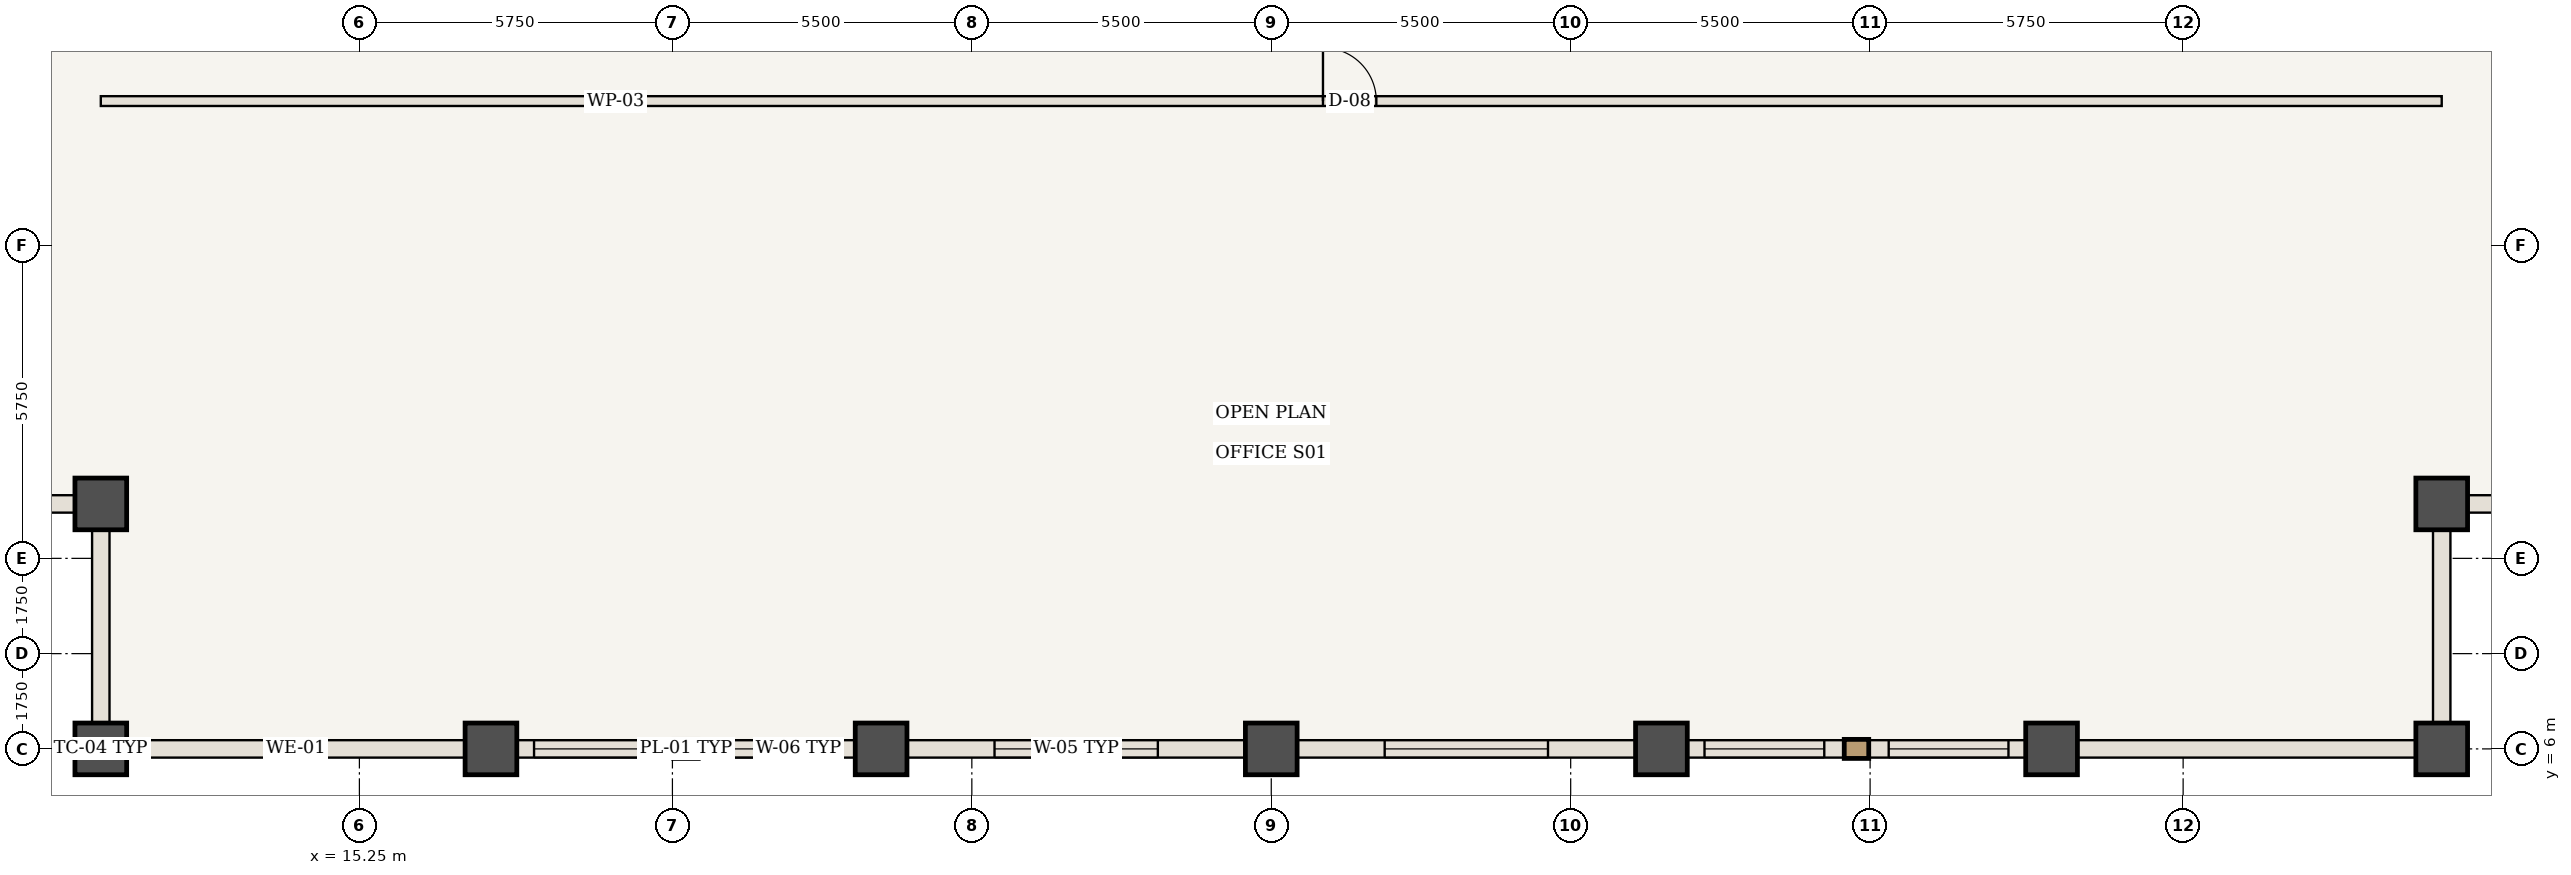
"""IFC4 building model, lengths in metres.
Left out: names, types, materials, properties, quantities, classifications, styles, units other than length and angle.
Written with IfcOpenShell. Run it as: python <this file> out.ifc"""

import sys

from ifc_helpers import new_model, si_unit, direction, frame, frame_2d, origin, origin_2d, place, context, subcontext, project, spatial, rectangle, extrude, element, fill, save


model = new_model("IFC4")
c1 = context("Model", 3, precision=1e-05, world=origin(), true_north=direction((0.0, 1.0)))
c2 = subcontext(c1, "Body", "Model", "MODEL_VIEW")
j1 = project(units=[si_unit("LENGTHUNIT", "METRE"), si_unit("PLANEANGLEUNIT", "RADIAN")], contexts=[c1])
p1 = place(None, origin())
s1 = spatial("IfcSite", under=j1, at=p1, CompositionType="ELEMENT")
p2 = place(p1, origin())
s2 = spatial("IfcBuilding", under=s1, at=p2, CompositionType="ELEMENT")
p3 = place(p2, frame((0.0, 0.0, 152.95)))
s3 = spatial("IfcBuildingStorey", under=s2, at=p3, CompositionType="ELEMENT", Elevation=152.95)
for number, where, z_axis, x_axis in (
    (1, (10.5, 6.0, 0.0), (0.0, 0.0, 1.0), (1.0, 0.0, 0.0)),
    (2, (10.5, 10.5, 0.0), (0.0, 0.0, 1.0), (1.0, 0.0, 0.0)),
    (3, (53.5, 6.0, 0.0), (0.0, 0.0, 1.0), (1.0, 0.0, 0.0)),
    (4, (53.5, 10.5, 0.0), (0.0, 0.0, 1.0), (1.0, 0.0, 0.0)),
    (5, (17.667, 6.0, 0.0), (0.0, 0.0, 1.0), (1.0, 0.0, 0.0)),
    (6, (24.833, 6.0, 0.0), (0.0, 0.0, 1.0), (1.0, 0.0, 0.0)),
    (7, (32.0, 6.0, 0.0), (0.0, 0.0, 1.0), (1.0, 0.0, 0.0)),
    (8, (39.167, 6.0, 0.0), (0.0, 0.0, 1.0), (1.0, 0.0, 0.0)),
    (9, (46.333, 6.0, 0.0), (0.0, 0.0, 1.0), (1.0, 0.0, 0.0)),
):
    element("IfcColumn", number, at=place(p3, frame(where, z_axis=z_axis, x_axis=x_axis)), inside=s3, PredefinedType="COLUMN", context=c2, shape_type="SweptSolid", body=[
        extrude(rectangle(XDim=0.95, YDim=0.95, at=origin_2d()), origin(), (0.0, 0.0, 1.0), 3.85),
    ])
p4 = place(p3, frame((10.5, 17.9, 0.0), z_axis=(0.0, 0.0, 1.0), x_axis=(1.0, 0.0, 0.0)))
e10 = element("IfcWall", 10, at=p4, inside=s3, PredefinedType="STANDARD", context=c2, shape_type="SweptSolid", body=[
    extrude(rectangle(XDim=43.0, YDim=0.18, at=frame_2d((21.5, 0.0))), origin(), (0.0, 0.0, 1.0), 3.685),
])
p5 = place(p4, frame((22.45, 0.0, 0.0)))
e11 = element("IfcOpeningElement", 11, at=p5, cuts=e10, PredefinedType="OPENING", context=c2, shape_type="SweptSolid", body=[
    extrude(rectangle(XDim=0.98, YDim=2.2, at=frame_2d((0.49, 1.1))), frame((0.0, 0.1, 0.0), z_axis=(0.0, -1.0, 0.0), x_axis=(1.0, 0.0, 0.0)), (0.0, 0.0, 1.0), 0.2),
])
p6 = place(p3, frame((17.667, 6.0, 0.0), z_axis=(0.0, 0.0, 1.0), x_axis=(-1.0, 0.0, 0.0)))
e12 = element("IfcWall", 12, at=p6, inside=s3, PredefinedType="USERDEFINED", context=c2, shape_type="SweptSolid", body=[
    extrude(rectangle(XDim=7.167, YDim=0.32, at=frame_2d((3.583, 0.0))), origin(), (0.0, 0.0, 1.0), 2.885),
])
p7 = place(p3, frame((24.833, 6.0, 0.0), z_axis=(0.0, 0.0, 1.0), x_axis=(-1.0, 0.0, 0.0)))
e13 = element("IfcWall", 13, at=p7, inside=s3, PredefinedType="USERDEFINED", context=c2, shape_type="SweptSolid", body=[
    extrude(rectangle(XDim=7.167, YDim=0.32, at=frame_2d((3.583, 0.0))), origin(), (0.0, 0.0, 1.0), 2.885),
])
p8 = place(p7, frame((0.792, 0.0, 0.85)))
e14 = element("IfcOpeningElement", 14, at=p8, cuts=e13, PredefinedType="OPENING", context=c2, shape_type="SweptSolid", body=[
    extrude(rectangle(XDim=2.2, YDim=1.835, at=frame_2d((1.1, 0.917))), frame((0.0, 0.17, 0.0), z_axis=(0.0, -1.0, 0.0), x_axis=(1.0, 0.0, 0.0)), (0.0, 0.0, 1.0), 0.34),
])
p9 = place(p7, frame((4.175, 0.0, 0.85)))
e15 = element("IfcOpeningElement", 15, at=p9, cuts=e13, PredefinedType="OPENING", context=c2, shape_type="SweptSolid", body=[
    extrude(rectangle(XDim=2.2, YDim=1.835, at=frame_2d((1.1, 0.917))), frame((0.0, 0.17, 0.0), z_axis=(0.0, -1.0, 0.0), x_axis=(1.0, 0.0, 0.0)), (0.0, 0.0, 1.0), 0.34),
])
p10 = place(p3, frame((32.0, 6.0, 0.0), z_axis=(0.0, 0.0, 1.0), x_axis=(-1.0, 0.0, 0.0)))
e16 = element("IfcWall", 16, at=p10, inside=s3, PredefinedType="USERDEFINED", context=c2, shape_type="SweptSolid", body=[
    extrude(rectangle(XDim=7.167, YDim=0.32, at=frame_2d((3.583, 0.0))), origin(), (0.0, 0.0, 1.0), 2.885),
])
p11 = place(p10, frame((2.083, 0.0, 0.85)))
e17 = element("IfcOpeningElement", 17, at=p11, cuts=e16, PredefinedType="OPENING", context=c2, shape_type="SweptSolid", body=[
    extrude(rectangle(XDim=3.0, YDim=1.835, at=frame_2d((1.5, 0.917))), frame((0.0, 0.17, 0.0), z_axis=(0.0, -1.0, 0.0), x_axis=(1.0, 0.0, 0.0)), (0.0, 0.0, 1.0), 0.34),
])
p12 = place(p3, frame((39.167, 6.0, 0.0), z_axis=(0.0, 0.0, 1.0), x_axis=(-1.0, 0.0, 0.0)))
e18 = element("IfcWall", 18, at=p12, inside=s3, PredefinedType="USERDEFINED", context=c2, shape_type="SweptSolid", body=[
    extrude(rectangle(XDim=7.167, YDim=0.32, at=frame_2d((3.583, 0.0))), origin(), (0.0, 0.0, 1.0), 2.885),
])
p13 = place(p12, frame((2.083, 0.0, 0.85)))
e19 = element("IfcOpeningElement", 19, at=p13, cuts=e18, PredefinedType="OPENING", context=c2, shape_type="SweptSolid", body=[
    extrude(rectangle(XDim=3.0, YDim=1.835, at=frame_2d((1.5, 0.917))), frame((0.0, 0.17, 0.0), z_axis=(0.0, -1.0, 0.0), x_axis=(1.0, 0.0, 0.0)), (0.0, 0.0, 1.0), 0.34),
])
p14 = place(p3, frame((46.333, 6.0, 0.0), z_axis=(0.0, 0.0, 1.0), x_axis=(-1.0, 0.0, 0.0)))
e20 = element("IfcWall", 20, at=p14, inside=s3, PredefinedType="USERDEFINED", context=c2, shape_type="SweptSolid", body=[
    extrude(rectangle(XDim=7.167, YDim=0.32, at=frame_2d((3.583, 0.0))), origin(), (0.0, 0.0, 1.0), 2.885),
])
p15 = place(p14, frame((0.792, 0.0, 0.85)))
e21 = element("IfcOpeningElement", 21, at=p15, cuts=e20, PredefinedType="OPENING", context=c2, shape_type="SweptSolid", body=[
    extrude(rectangle(XDim=2.2, YDim=1.835, at=frame_2d((1.1, 0.917))), frame((0.0, 0.17, 0.0), z_axis=(0.0, -1.0, 0.0), x_axis=(1.0, 0.0, 0.0)), (0.0, 0.0, 1.0), 0.34),
])
p16 = place(p14, frame((4.175, 0.0, 0.85)))
e22 = element("IfcOpeningElement", 22, at=p16, cuts=e20, PredefinedType="OPENING", context=c2, shape_type="SweptSolid", body=[
    extrude(rectangle(XDim=2.2, YDim=1.835, at=frame_2d((1.1, 0.917))), frame((0.0, 0.17, 0.0), z_axis=(0.0, -1.0, 0.0), x_axis=(1.0, 0.0, 0.0)), (0.0, 0.0, 1.0), 0.34),
])
p17 = place(p3, frame((53.5, 6.0, 0.0), z_axis=(0.0, 0.0, 1.0), x_axis=(-1.0, 0.0, 0.0)))
e23 = element("IfcWall", 23, at=p17, inside=s3, PredefinedType="USERDEFINED", context=c2, shape_type="SweptSolid", body=[
    extrude(rectangle(XDim=7.167, YDim=0.32, at=frame_2d((3.583, 0.0))), origin(), (0.0, 0.0, 1.0), 2.885),
])
for number, where, z_axis, x_axis in (
    (24, (10.5, 6.0, 0.0), (0.0, 0.0, 1.0), (0.0, 1.0, 0.0)),
    (25, (10.5, 10.5, 0.0), (0.0, 0.0, 1.0), (-1.0, 0.0, 0.0)),
    (26, (53.5, 10.5, 0.0), (0.0, 0.0, 1.0), (0.0, -1.0, 0.0)),
    (27, (58.0, 10.5, 0.0), (0.0, 0.0, 1.0), (-1.0, 0.0, 0.0)),
):
    element("IfcWall", number, at=place(p3, frame(where, z_axis=z_axis, x_axis=x_axis)), inside=s3, PredefinedType="USERDEFINED", context=c2, shape_type="SweptSolid", body=[
        extrude(rectangle(XDim=4.5, YDim=0.32, at=frame_2d((2.25, 0.0))), origin(), (0.0, 0.0, 1.0), 2.885),
    ])
p18 = place(p5, origin())
e28 = element("IfcDoor", 28, at=p18, inside=s3, OperationType="SINGLE_SWING_LEFT", PredefinedType="DOOR", context=c2, shape_type="SweptSolid", body=[
    extrude(rectangle(XDim=0.98, YDim=2.2, at=frame_2d((0.49, 1.1))), frame((0.0, 0.025, 0.0), z_axis=(0.0, -1.0, 0.0), x_axis=(1.0, 0.0, 0.0)), (0.0, 0.0, 1.0), 0.05),
])
fill(e11, e28)
p19 = place(p8, origin())
e29 = element("IfcWindow", 29, at=p19, inside=s3, PartitioningType="SINGLE_PANEL", PredefinedType="WINDOW", context=c2, shape_type="SweptSolid", body=[
    extrude(rectangle(XDim=2.2, YDim=1.835, at=frame_2d((1.1, 0.917))), frame((0.0, 0.03, 0.0), z_axis=(0.0, -1.0, 0.0), x_axis=(1.0, 0.0, 0.0)), (0.0, 0.0, 1.0), 0.06),
])
fill(e14, e29)
p20 = place(p9, origin())
e30 = element("IfcWindow", 30, at=p20, inside=s3, PartitioningType="SINGLE_PANEL", PredefinedType="WINDOW", context=c2, shape_type="SweptSolid", body=[
    extrude(rectangle(XDim=2.2, YDim=1.835, at=frame_2d((1.1, 0.917))), frame((0.0, 0.03, 0.0), z_axis=(0.0, -1.0, 0.0), x_axis=(1.0, 0.0, 0.0)), (0.0, 0.0, 1.0), 0.06),
])
fill(e15, e30)
p21 = place(p11, origin())
e31 = element("IfcWindow", 31, at=p21, inside=s3, PartitioningType="SINGLE_PANEL", PredefinedType="WINDOW", context=c2, shape_type="SweptSolid", body=[
    extrude(rectangle(XDim=3.0, YDim=1.835, at=frame_2d((1.5, 0.917))), frame((0.0, 0.03, 0.0), z_axis=(0.0, -1.0, 0.0), x_axis=(1.0, 0.0, 0.0)), (0.0, 0.0, 1.0), 0.06),
])
fill(e17, e31)
p22 = place(p13, origin())
e32 = element("IfcWindow", 32, at=p22, inside=s3, PartitioningType="SINGLE_PANEL", PredefinedType="WINDOW", context=c2, shape_type="SweptSolid", body=[
    extrude(rectangle(XDim=3.0, YDim=1.835, at=frame_2d((1.5, 0.917))), frame((0.0, 0.03, 0.0), z_axis=(0.0, -1.0, 0.0), x_axis=(1.0, 0.0, 0.0)), (0.0, 0.0, 1.0), 0.06),
])
fill(e19, e32)
p23 = place(p15, origin())
e33 = element("IfcWindow", 33, at=p23, inside=s3, PartitioningType="SINGLE_PANEL", PredefinedType="WINDOW", context=c2, shape_type="SweptSolid", body=[
    extrude(rectangle(XDim=2.2, YDim=1.835, at=frame_2d((1.1, 0.917))), frame((0.0, 0.03, 0.0), z_axis=(0.0, -1.0, 0.0), x_axis=(1.0, 0.0, 0.0)), (0.0, 0.0, 1.0), 0.06),
])
fill(e21, e33)
p24 = place(p16, origin())
e34 = element("IfcWindow", 34, at=p24, inside=s3, PartitioningType="SINGLE_PANEL", PredefinedType="WINDOW", context=c2, shape_type="SweptSolid", body=[
    extrude(rectangle(XDim=2.2, YDim=1.835, at=frame_2d((1.1, 0.917))), frame((0.0, 0.03, 0.0), z_axis=(0.0, -1.0, 0.0), x_axis=(1.0, 0.0, 0.0)), (0.0, 0.0, 1.0), 0.06),
])
fill(e22, e34)
save(model, sys.argv[1])
